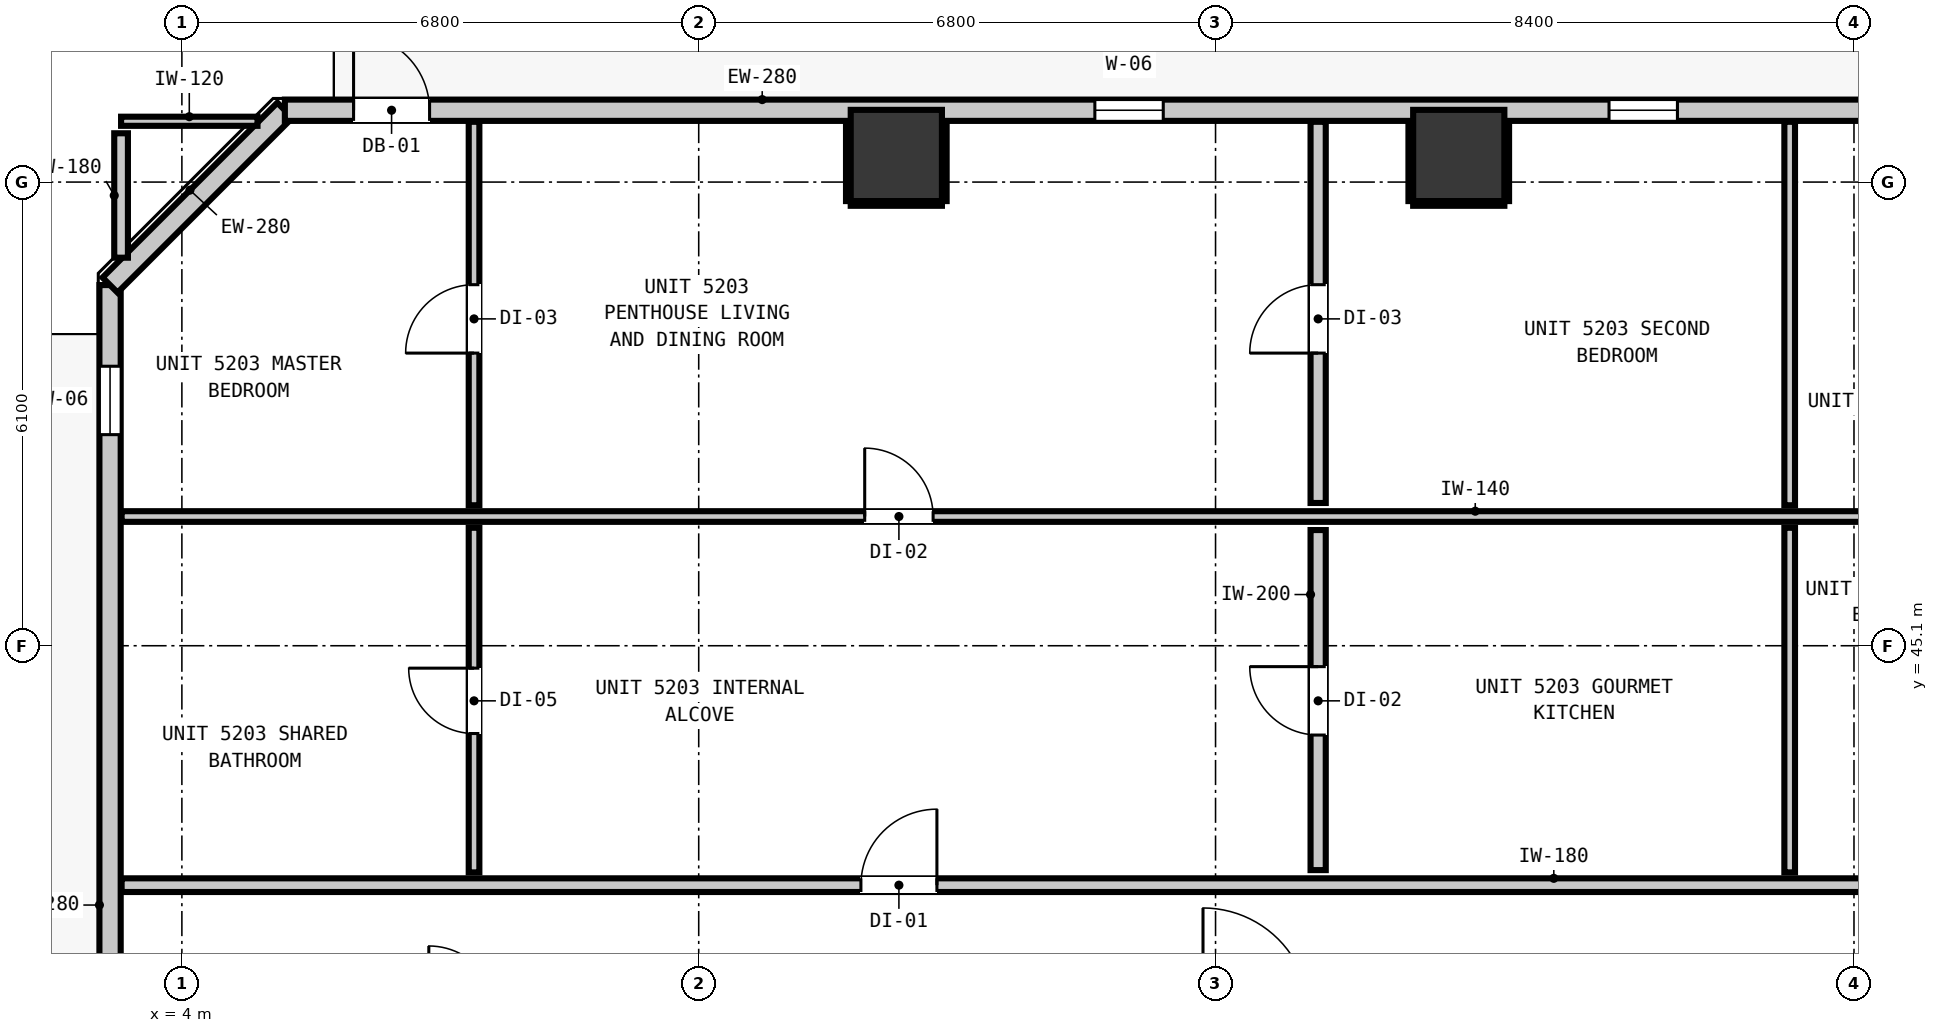
"""IFC4 building model, lengths in metres.
Left out: names, types, materials, properties, quantities, classifications, styles, units other than length and angle.
Written with IfcOpenShell. Run it as: python <this file> out.ifc"""

import sys

from ifc_helpers import new_model, si_unit, direction, frame, frame_2d, origin, origin_2d, place, context, subcontext, project, spatial, rectangle, extrude, element, fill, save


model = new_model("IFC4")
c1 = context("Model", 3, precision=1e-05, world=origin(), true_north=direction((0.0, 1.0)))
c2 = subcontext(c1, "Body", "Model", "MODEL_VIEW")
j1 = project(units=[si_unit("LENGTHUNIT", "METRE"), si_unit("PLANEANGLEUNIT", "RADIAN")], contexts=[c1])
p1 = place(None, origin())
s1 = spatial("IfcSite", under=j1, at=p1, CompositionType="ELEMENT")
p2 = place(p1, origin())
s2 = spatial("IfcBuilding", under=s1, at=p2, CompositionType="ELEMENT")
p3 = place(p2, frame((0.0, 0.0, 180.2)))
s3 = spatial("IfcBuildingStorey", under=s2, at=p3, CompositionType="ELEMENT", Elevation=180.2)
for number, where, z_axis, x_axis in (
    (1, (13.4, 51.55, 0.0), (0.0, 0.0, 1.0), (1.0, 0.0, 0.0)),
    (2, (20.8, 51.55, 0.0), (0.0, 0.0, 1.0), (1.0, 0.0, 0.0)),
):
    element("IfcColumn", number, at=place(p3, frame(where, z_axis=z_axis, x_axis=x_axis)), inside=s3, PredefinedType="COLUMN", context=c2, shape_type="SweptSolid", body=[
        extrude(rectangle(XDim=1.2, YDim=1.2, at=origin_2d()), origin(), (0.0, 0.0, 1.0), 3.32),
    ])
p4 = place(p3, frame((3.055, 17.555, 0.0), z_axis=(0.0, 0.0, 1.0), x_axis=(0.0, 1.0, 0.0)))
e3 = element("IfcWall", 3, at=p4, inside=s3, PredefinedType="STANDARD", context=c2, shape_type="SweptSolid", body=[
    extrude(rectangle(XDim=32.29, YDim=0.28, at=frame_2d((16.145, 0.0))), origin(), (0.0, 0.0, 1.0), 3.08),
])
p5 = place(p4, frame((8.625, 0.0, 0.0)))
e4 = element("IfcOpeningElement", 4, at=p5, cuts=e3, PredefinedType="OPENING", context=c2, shape_type="SweptSolid", body=[
    extrude(rectangle(XDim=1.0, YDim=2.15, at=frame_2d((0.5, 1.075))), frame((0.0, 0.15, 0.0), z_axis=(0.0, -1.0, 0.0), x_axis=(1.0, 0.0, 0.0)), (0.0, 0.0, 1.0), 0.3),
])
p6 = place(p4, frame((30.322, 0.0, 0.85)))
e5 = element("IfcOpeningElement", 5, at=p6, cuts=e3, PredefinedType="OPENING", context=c2, shape_type="SweptSolid", body=[
    extrude(rectangle(XDim=0.9, YDim=1.5, at=frame_2d((0.45, 0.75))), frame((0.0, 0.15, 0.0), z_axis=(0.0, -1.0, 0.0), x_axis=(1.0, 0.0, 0.0)), (0.0, 0.0, 1.0), 0.3),
])
p7 = place(p4, frame((10.785, 0.0, 0.85)))
e6 = element("IfcOpeningElement", 6, at=p7, cuts=e3, PredefinedType="OPENING", context=c2, shape_type="SweptSolid", body=[
    extrude(rectangle(XDim=0.9, YDim=1.5, at=frame_2d((0.45, 0.75))), frame((0.0, 0.15, 0.0), z_axis=(0.0, -1.0, 0.0), x_axis=(1.0, 0.0, 0.0)), (0.0, 0.0, 1.0), 0.3),
])
p8 = place(p4, frame((17.045, 0.0, 0.85)))
e7 = element("IfcOpeningElement", 7, at=p8, cuts=e3, PredefinedType="OPENING", context=c2, shape_type="SweptSolid", body=[
    extrude(rectangle(XDim=0.9, YDim=1.5, at=frame_2d((0.45, 0.75))), frame((0.0, 0.15, 0.0), z_axis=(0.0, -1.0, 0.0), x_axis=(1.0, 0.0, 0.0)), (0.0, 0.0, 1.0), 0.3),
])
p9 = place(p3, frame((3.055, 49.845, 0.0), z_axis=(0.0, 0.0, 1.0), x_axis=(0.707106781187, 0.707106781187, 0.0)))
e8 = element("IfcWall", 8, at=p9, inside=s3, PredefinedType="STANDARD", context=c2, shape_type="SweptSolid", body=[
    extrude(rectangle(XDim=3.253, YDim=0.28, at=frame_2d((1.626, 0.0))), origin(), (0.0, 0.0, 1.0), 3.08),
])
p10 = place(p3, frame((5.355, 52.145, 0.0), z_axis=(0.0, 0.0, 1.0), x_axis=(1.0, 0.0, 0.0)))
e9 = element("IfcWall", 9, at=p10, inside=s3, PredefinedType="STANDARD", context=c2, shape_type="SweptSolid", body=[
    extrude(rectangle(XDim=35.09, YDim=0.28, at=frame_2d((17.545, 0.0))), origin(), (0.0, 0.0, 1.0), 3.08),
])
p11 = place(p10, frame((0.904, 0.0, 0.0)))
e10 = element("IfcOpeningElement", 10, at=p11, cuts=e9, PredefinedType="OPENING", context=c2, shape_type="SweptSolid", body=[
    extrude(rectangle(XDim=1.0, YDim=2.15, at=frame_2d((0.5, 1.075))), frame((0.0, 0.15, 0.0), z_axis=(0.0, -1.0, 0.0), x_axis=(1.0, 0.0, 0.0)), (0.0, 0.0, 1.0), 0.3),
])
p12 = place(p10, frame((10.657, 0.0, 0.85)))
e11 = element("IfcOpeningElement", 11, at=p12, cuts=e9, PredefinedType="OPENING", context=c2, shape_type="SweptSolid", body=[
    extrude(rectangle(XDim=0.9, YDim=1.5, at=frame_2d((0.45, 0.75))), frame((0.0, 0.15, 0.0), z_axis=(0.0, -1.0, 0.0), x_axis=(1.0, 0.0, 0.0)), (0.0, 0.0, 1.0), 0.3),
])
p13 = place(p10, frame((17.422, 0.0, 0.85)))
e12 = element("IfcOpeningElement", 12, at=p13, cuts=e9, PredefinedType="OPENING", context=c2, shape_type="SweptSolid", body=[
    extrude(rectangle(XDim=0.9, YDim=1.5, at=frame_2d((0.45, 0.75))), frame((0.0, 0.15, 0.0), z_axis=(0.0, -1.0, 0.0), x_axis=(1.0, 0.0, 0.0)), (0.0, 0.0, 1.0), 0.3),
])
p14 = place(p10, frame((25.687, 0.0, 0.85)))
e13 = element("IfcOpeningElement", 13, at=p14, cuts=e9, PredefinedType="OPENING", context=c2, shape_type="SweptSolid", body=[
    extrude(rectangle(XDim=0.9, YDim=1.5, at=frame_2d((0.45, 0.75))), frame((0.0, 0.15, 0.0), z_axis=(0.0, -1.0, 0.0), x_axis=(1.0, 0.0, 0.0)), (0.0, 0.0, 1.0), 0.3),
])
p15 = place(p10, frame((20.797, 0.0, 0.85)))
e14 = element("IfcOpeningElement", 14, at=p15, cuts=e9, PredefinedType="OPENING", context=c2, shape_type="SweptSolid", body=[
    extrude(rectangle(XDim=0.9, YDim=1.5, at=frame_2d((0.45, 0.75))), frame((0.0, 0.15, 0.0), z_axis=(0.0, -1.0, 0.0), x_axis=(1.0, 0.0, 0.0)), (0.0, 0.0, 1.0), 0.3),
])
p16 = place(p10, frame((28.837, 0.0, 0.85)))
e15 = element("IfcOpeningElement", 15, at=p16, cuts=e9, PredefinedType="OPENING", context=c2, shape_type="SweptSolid", body=[
    extrude(rectangle(XDim=0.9, YDim=1.5, at=frame_2d((0.45, 0.75))), frame((0.0, 0.15, 0.0), z_axis=(0.0, -1.0, 0.0), x_axis=(1.0, 0.0, 0.0)), (0.0, 0.0, 1.0), 0.3),
])
p17 = place(p10, frame((33.673, 0.0, 0.85)))
e16 = element("IfcOpeningElement", 16, at=p17, cuts=e9, PredefinedType="OPENING", context=c2, shape_type="SweptSolid", body=[
    extrude(rectangle(XDim=0.9, YDim=1.5, at=frame_2d((0.45, 0.75))), frame((0.0, 0.15, 0.0), z_axis=(0.0, -1.0, 0.0), x_axis=(1.0, 0.0, 0.0)), (0.0, 0.0, 1.0), 0.3),
])
p18 = place(p3, frame((3.207, 41.95, 0.0), z_axis=(0.0, 0.0, 1.0), x_axis=(1.0, 0.0, 0.0)))
e17 = element("IfcWall", 17, at=p18, inside=s3, PredefinedType="PARTITIONING", context=c2, shape_type="SweptSolid", body=[
    extrude(rectangle(XDim=39.386, YDim=0.18, at=frame_2d((19.693, 0.0))), origin(), (0.0, 0.0, 1.0), 3.08),
])
p19 = place(p18, frame((9.727, 0.0, 0.0)))
e18 = element("IfcOpeningElement", 18, at=p19, cuts=e17, PredefinedType="OPENING", context=c2, shape_type="SweptSolid", body=[
    extrude(rectangle(XDim=1.0, YDim=2.15, at=frame_2d((0.5, 1.075))), frame((0.0, 0.1, 0.0), z_axis=(0.0, -1.0, 0.0), x_axis=(1.0, 0.0, 0.0)), (0.0, 0.0, 1.0), 0.2),
])
p20 = place(p18, frame((26.96, 0.0, 0.0)))
e19 = element("IfcOpeningElement", 19, at=p20, cuts=e17, PredefinedType="OPENING", context=c2, shape_type="SweptSolid", body=[
    extrude(rectangle(XDim=1.0, YDim=2.15, at=frame_2d((0.5, 1.075))), frame((0.0, 0.1, 0.0), z_axis=(0.0, -1.0, 0.0), x_axis=(1.0, 0.0, 0.0)), (0.0, 0.0, 1.0), 0.2),
])
p21 = place(p3, frame((3.207, 46.8, 0.0), z_axis=(0.0, 0.0, 1.0), x_axis=(1.0, 0.0, 0.0)))
e20 = element("IfcWall", 20, at=p21, inside=s3, PredefinedType="PARTITIONING", context=c2, shape_type="SweptSolid", body=[
    extrude(rectangle(XDim=24.843, YDim=0.14, at=frame_2d((12.421, 0.0))), origin(), (0.0, 0.0, 1.0), 3.08),
])
p22 = place(p21, frame((9.777, 0.0, 0.0)))
e21 = element("IfcOpeningElement", 21, at=p22, cuts=e20, PredefinedType="OPENING", context=c2, shape_type="SweptSolid", body=[
    extrude(rectangle(XDim=0.9, YDim=2.1, at=frame_2d((0.45, 1.05))), frame((0.0, 0.08, 0.0), z_axis=(0.0, -1.0, 0.0), x_axis=(1.0, 0.0, 0.0)), (0.0, 0.0, 1.0), 0.16),
])
p23 = place(p3, frame((3.2, 52.0, 0.0), z_axis=(0.0, 0.0, 1.0), x_axis=(1.0, 0.0, 0.0)))
e22 = element("IfcWall", 22, at=p23, inside=s3, PredefinedType="PARTITIONING", context=c2, shape_type="SweptSolid", body=[
    extrude(rectangle(XDim=1.795, YDim=0.12, at=frame_2d((0.897, 0.0))), origin(), (0.0, 0.0, 1.0), 3.08),
])
p24 = place(p3, frame((18.95, 42.148, 0.0), z_axis=(0.0, 0.0, 1.0), x_axis=(0.0, 1.0, 0.0)))
e23 = element("IfcWall", 23, at=p24, inside=s3, PredefinedType="PARTITIONING", context=c2, shape_type="SweptSolid", body=[
    extrude(rectangle(XDim=4.474, YDim=0.2, at=frame_2d((2.237, 0.0))), origin(), (0.0, 0.0, 1.0), 3.08),
])
p25 = place(p24, frame((1.777, 0.0, 0.0)))
e24 = element("IfcOpeningElement", 24, at=p25, cuts=e23, PredefinedType="OPENING", context=c2, shape_type="SweptSolid", body=[
    extrude(rectangle(XDim=0.9, YDim=2.1, at=frame_2d((0.45, 1.05))), frame((0.0, 0.11, 0.0), z_axis=(0.0, -1.0, 0.0), x_axis=(1.0, 0.0, 0.0)), (0.0, 0.0, 1.0), 0.22),
])
p26 = place(p3, frame((18.95, 46.978, 0.0), z_axis=(0.0, 0.0, 1.0), x_axis=(0.0, 1.0, 0.0)))
e25 = element("IfcWall", 25, at=p26, inside=s3, PredefinedType="PARTITIONING", context=c2, shape_type="SweptSolid", body=[
    extrude(rectangle(XDim=5.015, YDim=0.2, at=frame_2d((2.507, 0.0))), origin(), (0.0, 0.0, 1.0), 3.08),
])
p27 = place(p26, frame((1.972, 0.0, 0.0)))
e26 = element("IfcOpeningElement", 26, at=p27, cuts=e25, PredefinedType="OPENING", context=c2, shape_type="SweptSolid", body=[
    extrude(rectangle(XDim=0.9, YDim=2.1, at=frame_2d((0.45, 1.05))), frame((0.0, 0.11, 0.0), z_axis=(0.0, -1.0, 0.0), x_axis=(1.0, 0.0, 0.0)), (0.0, 0.0, 1.0), 0.22),
])
p28 = place(p3, frame((3.2, 50.205, 0.0), z_axis=(0.0, 0.0, 1.0), x_axis=(0.0, 1.0, 0.0)))
e27 = element("IfcWall", 27, at=p28, inside=s3, PredefinedType="PARTITIONING", context=c2, shape_type="SweptSolid", body=[
    extrude(rectangle(XDim=1.637, YDim=0.18, at=frame_2d((0.818, 0.0))), origin(), (0.0, 0.0, 1.0), 3.08),
])
p29 = place(p3, frame((7.844, 42.118, 0.0), z_axis=(0.0, 0.0, 1.0), x_axis=(0.0, 1.0, 0.0)))
e28 = element("IfcWall", 28, at=p29, inside=s3, PredefinedType="PARTITIONING", context=c2, shape_type="SweptSolid", body=[
    extrude(rectangle(XDim=4.534, YDim=0.14, at=frame_2d((2.267, 0.0))), origin(), (0.0, 0.0, 1.0), 3.08),
])
p30 = place(p29, frame((1.827, 0.0, 0.0)))
e29 = element("IfcOpeningElement", 29, at=p30, cuts=e28, PredefinedType="OPENING", context=c2, shape_type="SweptSolid", body=[
    extrude(rectangle(XDim=0.86, YDim=2.02, at=frame_2d((0.43, 1.01))), frame((0.0, 0.08, 0.0), z_axis=(0.0, -1.0, 0.0), x_axis=(1.0, 0.0, 0.0)), (0.0, 0.0, 1.0), 0.16),
])
p31 = place(p3, frame((7.844, 46.948, 0.0), z_axis=(0.0, 0.0, 1.0), x_axis=(0.0, 1.0, 0.0)))
e30 = element("IfcWall", 30, at=p31, inside=s3, PredefinedType="PARTITIONING", context=c2, shape_type="SweptSolid", body=[
    extrude(rectangle(XDim=5.045, YDim=0.14, at=frame_2d((2.522, 0.0))), origin(), (0.0, 0.0, 1.0), 3.08),
])
p32 = place(p31, frame((2.002, 0.0, 0.0)))
e31 = element("IfcOpeningElement", 31, at=p32, cuts=e30, PredefinedType="OPENING", context=c2, shape_type="SweptSolid", body=[
    extrude(rectangle(XDim=0.9, YDim=2.1, at=frame_2d((0.45, 1.05))), frame((0.0, 0.08, 0.0), z_axis=(0.0, -1.0, 0.0), x_axis=(1.0, 0.0, 0.0)), (0.0, 0.0, 1.0), 0.16),
])
p33 = place(p3, frame((25.154, 42.118, 0.0), z_axis=(0.0, 0.0, 1.0), x_axis=(0.0, 1.0, 0.0)))
e32 = element("IfcWall", 32, at=p33, inside=s3, PredefinedType="PARTITIONING", context=c2, shape_type="SweptSolid", body=[
    extrude(rectangle(XDim=4.534, YDim=0.14, at=frame_2d((2.267, 0.0))), origin(), (0.0, 0.0, 1.0), 3.08),
])
p34 = place(p3, frame((25.154, 46.948, 0.0), z_axis=(0.0, 0.0, 1.0), x_axis=(0.0, 1.0, 0.0)))
e33 = element("IfcWall", 33, at=p34, inside=s3, PredefinedType="PARTITIONING", context=c2, shape_type="SweptSolid", body=[
    extrude(rectangle(XDim=5.045, YDim=0.14, at=frame_2d((2.522, 0.0))), origin(), (0.0, 0.0, 1.0), 3.08),
])
p35 = place(p3, frame((12.8, 50.918, 0.0), z_axis=(0.0, 0.0, 1.0), x_axis=(1.0, 0.0, 0.0)))
e34 = element("IfcWall", 34, at=p35, inside=s3, PredefinedType="PARTITIONING", context=c2, shape_type="SweptSolid", body=[
    extrude(rectangle(XDim=1.2, YDim=0.06, at=frame_2d((0.6, 0.0))), origin(), (0.0, 0.0, 1.0), 1.45),
])
for number, where, z_axis, x_axis in (
    (35, (12.768, 50.95, 0.0), (0.0, 0.0, 1.0), (0.0, 1.0, 0.0)),
    (36, (14.032, 50.95, 0.0), (0.0, 0.0, 1.0), (0.0, 1.0, 0.0)),
):
    element("IfcWall", number, at=place(p3, frame(where, z_axis=z_axis, x_axis=x_axis)), inside=s3, PredefinedType="PARTITIONING", context=c2, shape_type="SweptSolid", body=[
        extrude(rectangle(XDim=1.04, YDim=0.06, at=frame_2d((0.52, 0.0))), origin(), (0.0, 0.0, 1.0), 1.45),
    ])
p36 = place(p3, frame((20.2, 50.918, 0.0), z_axis=(0.0, 0.0, 1.0), x_axis=(1.0, 0.0, 0.0)))
e37 = element("IfcWall", 37, at=p36, inside=s3, PredefinedType="PARTITIONING", context=c2, shape_type="SweptSolid", body=[
    extrude(rectangle(XDim=1.2, YDim=0.06, at=frame_2d((0.6, 0.0))), origin(), (0.0, 0.0, 1.0), 1.45),
])
for number, where, z_axis, x_axis in (
    (38, (20.168, 50.95, 0.0), (0.0, 0.0, 1.0), (0.0, 1.0, 0.0)),
    (39, (21.432, 50.95, 0.0), (0.0, 0.0, 1.0), (0.0, 1.0, 0.0)),
):
    element("IfcWall", number, at=place(p3, frame(where, z_axis=z_axis, x_axis=x_axis)), inside=s3, PredefinedType="PARTITIONING", context=c2, shape_type="SweptSolid", body=[
        extrude(rectangle(XDim=1.04, YDim=0.06, at=frame_2d((0.52, 0.0))), origin(), (0.0, 0.0, 1.0), 1.45),
    ])
p37 = place(p11, origin())
e40 = element("IfcDoor", 40, at=p37, inside=s3, OperationType="SINGLE_SWING_LEFT", PredefinedType="DOOR", context=c2, shape_type="SweptSolid", body=[
    extrude(rectangle(XDim=1.0, YDim=2.15, at=frame_2d((0.5, 1.075))), frame((0.0, 0.025, 0.0), z_axis=(0.0, -1.0, 0.0), x_axis=(1.0, 0.0, 0.0)), (0.0, 0.0, 1.0), 0.05),
])
fill(e10, e40)
p38 = place(p6, origin())
e41 = element("IfcWindow", 41, at=p38, inside=s3, PartitioningType="SINGLE_PANEL", PredefinedType="WINDOW", context=c2, shape_type="SweptSolid", body=[
    extrude(rectangle(XDim=0.9, YDim=1.5, at=frame_2d((0.45, 0.75))), frame((0.0, 0.03, 0.0), z_axis=(0.0, -1.0, 0.0), x_axis=(1.0, 0.0, 0.0)), (0.0, 0.0, 1.0), 0.06),
])
fill(e5, e41)
p39 = place(p12, origin())
e42 = element("IfcWindow", 42, at=p39, inside=s3, PartitioningType="SINGLE_PANEL", PredefinedType="WINDOW", context=c2, shape_type="SweptSolid", body=[
    extrude(rectangle(XDim=0.9, YDim=1.5, at=frame_2d((0.45, 0.75))), frame((0.0, 0.03, 0.0), z_axis=(0.0, -1.0, 0.0), x_axis=(1.0, 0.0, 0.0)), (0.0, 0.0, 1.0), 0.06),
])
fill(e11, e42)
p40 = place(p13, origin())
e43 = element("IfcWindow", 43, at=p40, inside=s3, PartitioningType="SINGLE_PANEL", PredefinedType="WINDOW", context=c2, shape_type="SweptSolid", body=[
    extrude(rectangle(XDim=0.9, YDim=1.5, at=frame_2d((0.45, 0.75))), frame((0.0, 0.03, 0.0), z_axis=(0.0, -1.0, 0.0), x_axis=(1.0, 0.0, 0.0)), (0.0, 0.0, 1.0), 0.06),
])
fill(e12, e43)
p41 = place(p19, origin())
e44 = element("IfcDoor", 44, at=p41, inside=s3, OperationType="SINGLE_SWING_RIGHT", PredefinedType="DOOR", context=c2, shape_type="SweptSolid", body=[
    extrude(rectangle(XDim=1.0, YDim=2.15, at=frame_2d((0.5, 1.075))), frame((0.0, 0.025, 0.0), z_axis=(0.0, -1.0, 0.0), x_axis=(1.0, 0.0, 0.0)), (0.0, 0.0, 1.0), 0.05),
])
fill(e18, e44)
p42 = place(p22, origin())
e45 = element("IfcDoor", 45, at=p42, inside=s3, OperationType="SINGLE_SWING_LEFT", PredefinedType="DOOR", context=c2, shape_type="SweptSolid", body=[
    extrude(rectangle(XDim=0.9, YDim=2.1, at=frame_2d((0.45, 1.05))), frame((0.0, 0.025, 0.0), z_axis=(0.0, -1.0, 0.0), x_axis=(1.0, 0.0, 0.0)), (0.0, 0.0, 1.0), 0.05),
])
fill(e21, e45)
p43 = place(p30, origin())
e46 = element("IfcDoor", 46, at=p43, inside=s3, OperationType="SINGLE_SWING_RIGHT", PredefinedType="DOOR", context=c2, shape_type="SweptSolid", body=[
    extrude(rectangle(XDim=0.86, YDim=2.02, at=frame_2d((0.43, 1.01))), frame((0.0, 0.025, 0.0), z_axis=(0.0, -1.0, 0.0), x_axis=(1.0, 0.0, 0.0)), (0.0, 0.0, 1.0), 0.05),
])
fill(e29, e46)
p44 = place(p32, origin())
e47 = element("IfcDoor", 47, at=p44, inside=s3, OperationType="SINGLE_SWING_LEFT", PredefinedType="DOOR", context=c2, shape_type="SweptSolid", body=[
    extrude(rectangle(XDim=0.9, YDim=2.1, at=frame_2d((0.45, 1.05))), frame((0.0, 0.025, 0.0), z_axis=(0.0, -1.0, 0.0), x_axis=(1.0, 0.0, 0.0)), (0.0, 0.0, 1.0), 0.05),
])
fill(e31, e47)
p45 = place(p25, origin())
e48 = element("IfcDoor", 48, at=p45, inside=s3, OperationType="SINGLE_SWING_RIGHT", PredefinedType="DOOR", context=c2, shape_type="SweptSolid", body=[
    extrude(rectangle(XDim=0.9, YDim=2.1, at=frame_2d((0.45, 1.05))), frame((0.0, 0.025, 0.0), z_axis=(0.0, -1.0, 0.0), x_axis=(1.0, 0.0, 0.0)), (0.0, 0.0, 1.0), 0.05),
])
fill(e24, e48)
p46 = place(p27, origin())
e49 = element("IfcDoor", 49, at=p46, inside=s3, OperationType="SINGLE_SWING_LEFT", PredefinedType="DOOR", context=c2, shape_type="SweptSolid", body=[
    extrude(rectangle(XDim=0.9, YDim=2.1, at=frame_2d((0.45, 1.05))), frame((0.0, 0.025, 0.0), z_axis=(0.0, -1.0, 0.0), x_axis=(1.0, 0.0, 0.0)), (0.0, 0.0, 1.0), 0.05),
])
fill(e26, e49)
save(model, sys.argv[1])
